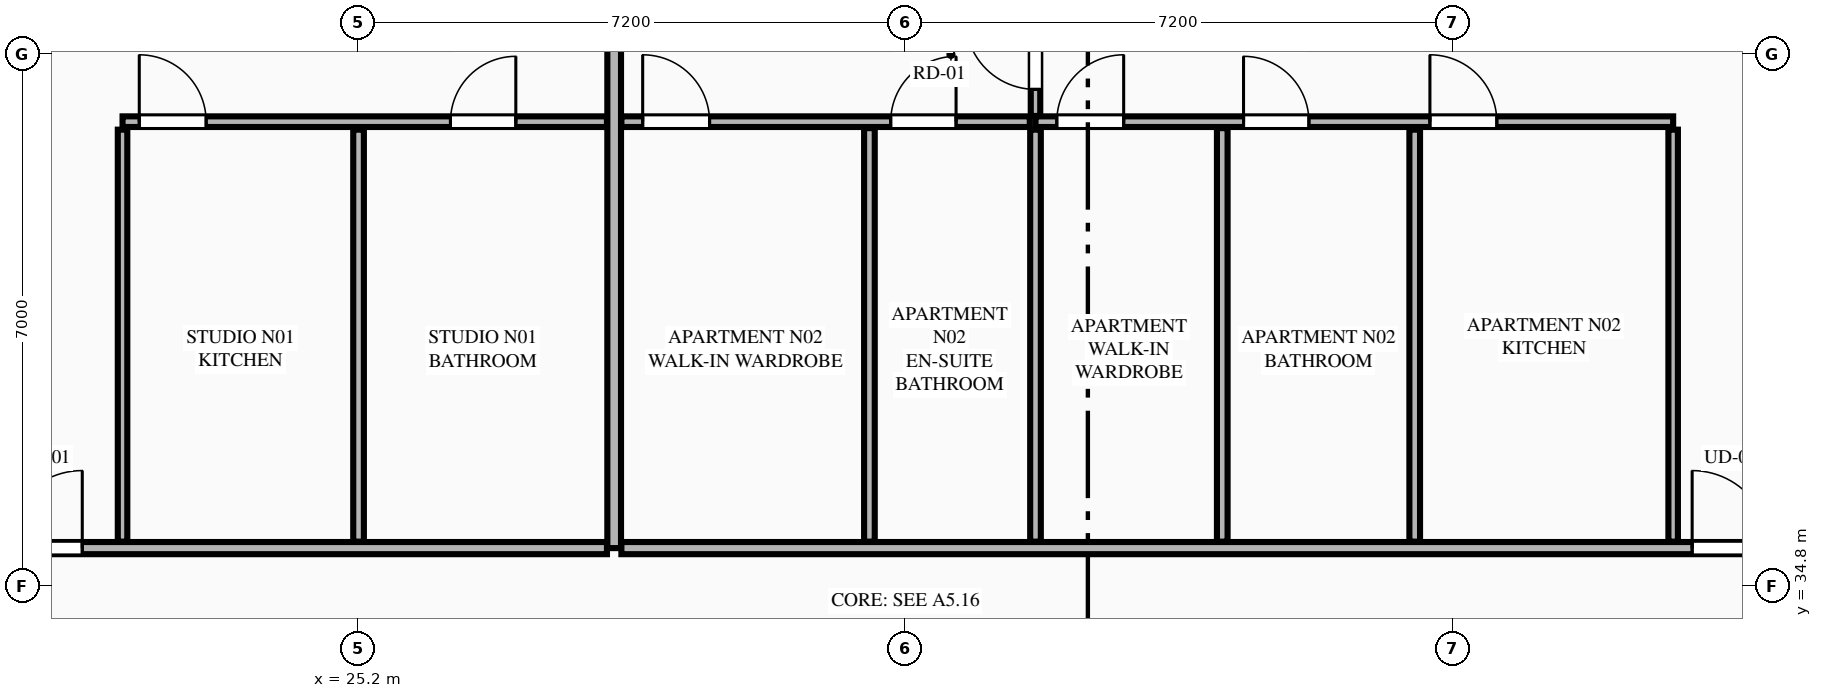
"""IFC4 building model, lengths in metres.
Left out: names, types, materials, properties, quantities, classifications, styles, units other than length and angle.
Written with IfcOpenShell. Run it as: python <this file> out.ifc"""

import sys

from ifc_helpers import new_model, si_unit, direction, frame, frame_2d, origin, place, context, subcontext, project, spatial, rectangle, extrude, element, fill, save


model = new_model("IFC4")
c1 = context("Model", 3, precision=1e-05, world=origin(), true_north=direction((0.0, 1.0)))
c2 = subcontext(c1, "Body", "Model", "MODEL_VIEW")
j1 = project(units=[si_unit("LENGTHUNIT", "METRE"), si_unit("PLANEANGLEUNIT", "RADIAN")], contexts=[c1])
p1 = place(None, origin())
s1 = spatial("IfcSite", under=j1, at=p1, CompositionType="ELEMENT")
p2 = place(p1, origin())
s2 = spatial("IfcBuilding", under=s1, at=p2, CompositionType="ELEMENT")
p3 = place(p2, frame((0.0, 0.0, 109.05)))
s3 = spatial("IfcBuildingStorey", under=s2, at=p3, CompositionType="ELEMENT", Elevation=109.05)
p4 = place(p3, frame((28.568, 35.3, 0.0), z_axis=(0.0, 0.0, 1.0), x_axis=(0.0, 1.0, 0.0)))
e1 = element("IfcWall", 1, at=p4, inside=s3, PredefinedType="PARTITIONING", context=c2, shape_type="SweptSolid", body=[
    extrude(rectangle(XDim=12.195, YDim=0.18, at=frame_2d((6.098, 0.0))), origin(), (0.0, 0.0, 1.0), 2.722),
])
p5 = place(p3, frame((20.145, 35.3, 0.0), z_axis=(0.0, 0.0, 1.0), x_axis=(1.0, 0.0, 0.0)))
e2 = element("IfcWall", 2, at=p5, inside=s3, PredefinedType="PARTITIONING", context=c2, shape_type="SweptSolid", body=[
    extrude(rectangle(XDim=8.328, YDim=0.16, at=frame_2d((4.164, 0.0))), origin(), (0.0, 0.0, 1.0), 3.34),
])
p6 = place(p5, frame((0.405, 0.0, 0.0)))
e3 = element("IfcOpeningElement", 3, at=p6, cuts=e2, PredefinedType="OPENING", context=c2, shape_type="SweptSolid", body=[
    extrude(rectangle(XDim=1.02, YDim=2.25, at=frame_2d((0.51, 1.125))), frame((0.0, 0.09, 0.0), z_axis=(0.0, -1.0, 0.0), x_axis=(1.0, 0.0, 0.0)), (0.0, 0.0, 1.0), 0.18),
])
p7 = place(p3, frame((22.1, 35.385, 0.0), z_axis=(0.0, 0.0, 1.0), x_axis=(0.0, 1.0, 0.0)))
e4 = element("IfcWall", 4, at=p7, inside=s3, PredefinedType="PARTITIONING", context=c2, shape_type="SweptSolid", body=[
    extrude(rectangle(XDim=5.42, YDim=0.125, at=frame_2d((2.71, 0.0))), origin(), (0.0, 0.0, 1.0), 2.722),
])
p8 = place(p3, frame((22.1, 40.91, 0.0), z_axis=(0.0, 0.0, 1.0), x_axis=(1.0, 0.0, 0.0)))
e5 = element("IfcWall", 5, at=p8, inside=s3, PredefinedType="PLUMBINGWALL", context=c2, shape_type="SweptSolid", body=[
    extrude(rectangle(XDim=6.373, YDim=0.14, at=frame_2d((3.187, 0.0))), origin(), (0.0, 0.0, 1.0), 3.34),
])
p9 = place(p8, frame((4.314, 0.0, 0.0)))
e6 = element("IfcOpeningElement", 6, at=p9, cuts=e5, PredefinedType="OPENING", context=c2, shape_type="SweptSolid", body=[
    extrude(rectangle(XDim=0.86, YDim=2.1, at=frame_2d((0.43, 1.05))), frame((0.0, 0.08, 0.0), z_axis=(0.0, -1.0, 0.0), x_axis=(1.0, 0.0, 0.0)), (0.0, 0.0, 1.0), 0.16),
])
p10 = place(p8, frame((0.22, 0.0, 0.0)))
e7 = element("IfcOpeningElement", 7, at=p10, cuts=e5, PredefinedType="OPENING", context=c2, shape_type="SweptSolid", body=[
    extrude(rectangle(XDim=0.88, YDim=2.15, at=frame_2d((0.44, 1.075))), frame((0.0, 0.08, 0.0), z_axis=(0.0, -1.0, 0.0), x_axis=(1.0, 0.0, 0.0)), (0.0, 0.0, 1.0), 0.16),
])
p11 = place(p3, frame((25.205, 35.385, 0.0), z_axis=(0.0, 0.0, 1.0), x_axis=(0.0, 1.0, 0.0)))
e8 = element("IfcWall", 8, at=p11, inside=s3, PredefinedType="PLUMBINGWALL", context=c2, shape_type="SweptSolid", body=[
    extrude(rectangle(XDim=5.42, YDim=0.14, at=frame_2d((2.71, 0.0))), origin(), (0.0, 0.0, 1.0), 3.34),
])
p12 = place(p3, frame((28.663, 35.3, 0.0), z_axis=(0.0, 0.0, 1.0), x_axis=(1.0, 0.0, 0.0)))
e9 = element("IfcWall", 9, at=p12, inside=s3, PredefinedType="PARTITIONING", context=c2, shape_type="SweptSolid", body=[
    extrude(rectangle(XDim=15.992, YDim=0.16, at=frame_2d((7.996, 0.0))), origin(), (0.0, 0.0, 1.0), 3.34),
])
p13 = place(p12, frame((14.087, 0.0, 0.0)))
e10 = element("IfcOpeningElement", 10, at=p13, cuts=e9, PredefinedType="OPENING", context=c2, shape_type="SweptSolid", body=[
    extrude(rectangle(XDim=1.02, YDim=2.25, at=frame_2d((0.51, 1.125))), frame((0.0, 0.09, 0.0), z_axis=(0.0, -1.0, 0.0), x_axis=(1.0, 0.0, 0.0)), (0.0, 0.0, 1.0), 0.18),
])
p14 = place(p3, frame((42.5, 35.385, 0.0), z_axis=(0.0, 0.0, 1.0), x_axis=(0.0, 1.0, 0.0)))
e11 = element("IfcWall", 11, at=p14, inside=s3, PredefinedType="PARTITIONING", context=c2, shape_type="SweptSolid", body=[
    extrude(rectangle(XDim=5.42, YDim=0.125, at=frame_2d((2.71, 0.0))), origin(), (0.0, 0.0, 1.0), 2.722),
])
p15 = place(p3, frame((34.111, 40.91, 0.0), z_axis=(0.0, 0.0, 1.0), x_axis=(1.0, 0.0, 0.0)))
e12 = element("IfcWall", 12, at=p15, inside=s3, PredefinedType="PLUMBINGWALL", context=c2, shape_type="SweptSolid", body=[
    extrude(rectangle(XDim=8.389, YDim=0.14, at=frame_2d((4.194, 0.0))), origin(), (0.0, 0.0, 1.0), 3.34),
])
p16 = place(p15, frame((0.28, 0.0, 0.0)))
e13 = element("IfcOpeningElement", 13, at=p16, cuts=e12, PredefinedType="OPENING", context=c2, shape_type="SweptSolid", body=[
    extrude(rectangle(XDim=0.88, YDim=2.15, at=frame_2d((0.44, 1.075))), frame((0.0, 0.08, 0.0), z_axis=(0.0, -1.0, 0.0), x_axis=(1.0, 0.0, 0.0)), (0.0, 0.0, 1.0), 0.16),
])
p17 = place(p15, frame((2.737, 0.0, 0.0)))
e14 = element("IfcOpeningElement", 14, at=p17, cuts=e12, PredefinedType="OPENING", context=c2, shape_type="SweptSolid", body=[
    extrude(rectangle(XDim=0.86, YDim=2.1, at=frame_2d((0.43, 1.05))), frame((0.0, 0.08, 0.0), z_axis=(0.0, -1.0, 0.0), x_axis=(1.0, 0.0, 0.0)), (0.0, 0.0, 1.0), 0.16),
])
p18 = place(p15, frame((5.189, 0.0, 0.0)))
e15 = element("IfcOpeningElement", 15, at=p18, cuts=e12, PredefinedType="OPENING", context=c2, shape_type="SweptSolid", body=[
    extrude(rectangle(XDim=0.88, YDim=2.15, at=frame_2d((0.44, 1.075))), frame((0.0, 0.08, 0.0), z_axis=(0.0, -1.0, 0.0), x_axis=(1.0, 0.0, 0.0)), (0.0, 0.0, 1.0), 0.16),
])
p19 = place(p3, frame((28.663, 40.91, 0.0), z_axis=(0.0, 0.0, 1.0), x_axis=(1.0, 0.0, 0.0)))
e16 = element("IfcWall", 16, at=p19, inside=s3, PredefinedType="PLUMBINGWALL", context=c2, shape_type="SweptSolid", body=[
    extrude(rectangle(XDim=5.373, YDim=0.14, at=frame_2d((2.687, 0.0))), origin(), (0.0, 0.0, 1.0), 3.34),
])
p20 = place(p19, frame((0.28, 0.0, 0.0)))
e17 = element("IfcOpeningElement", 17, at=p20, cuts=e16, PredefinedType="OPENING", context=c2, shape_type="SweptSolid", body=[
    extrude(rectangle(XDim=0.88, YDim=2.15, at=frame_2d((0.44, 1.075))), frame((0.0, 0.08, 0.0), z_axis=(0.0, -1.0, 0.0), x_axis=(1.0, 0.0, 0.0)), (0.0, 0.0, 1.0), 0.16),
])
p21 = place(p19, frame((3.543, 0.0, 0.0)))
e18 = element("IfcOpeningElement", 18, at=p21, cuts=e16, PredefinedType="OPENING", context=c2, shape_type="SweptSolid", body=[
    extrude(rectangle(XDim=0.86, YDim=2.1, at=frame_2d((0.43, 1.05))), frame((0.0, 0.08, 0.0), z_axis=(0.0, -1.0, 0.0), x_axis=(1.0, 0.0, 0.0)), (0.0, 0.0, 1.0), 0.16),
])
for number, where, z_axis, x_axis in (
    (19, (39.1, 35.385, 0.0), (0.0, 0.0, 1.0), (0.0, 1.0, 0.0)),
    (20, (34.111, 35.385, 0.0), (0.0, 0.0, 1.0), (0.0, 1.0, 0.0)),
):
    element("IfcWall", number, at=place(p3, frame(where, z_axis=z_axis, x_axis=x_axis)), inside=s3, PredefinedType="PLUMBINGWALL", context=c2, shape_type="SweptSolid", body=[
        extrude(rectangle(XDim=5.42, YDim=0.14, at=frame_2d((2.71, 0.0))), origin(), (0.0, 0.0, 1.0), 3.34),
    ])
p22 = place(p3, frame((34.111, 40.985, 0.0), z_axis=(0.0, 0.0, 1.0), x_axis=(0.0, 1.0, 0.0)))
e21 = element("IfcWall", 21, at=p22, inside=s3, PredefinedType="PARTITIONING", context=c2, shape_type="SweptSolid", body=[
    extrude(rectangle(XDim=6.6, YDim=0.125, at=frame_2d((3.3, 0.0))), origin(), (0.0, 0.0, 1.0), 3.34),
])
p23 = place(p22, frame((0.35, 0.0, 0.0)))
e22 = element("IfcOpeningElement", 22, at=p23, cuts=e21, PredefinedType="OPENING", context=c2, shape_type="SweptSolid", body=[
    extrude(rectangle(XDim=0.92, YDim=2.15, at=frame_2d((0.46, 1.075))), frame((0.0, 0.073, 0.0), z_axis=(0.0, -1.0, 0.0), x_axis=(1.0, 0.0, 0.0)), (0.0, 0.0, 1.0), 0.145),
])
for number, where, z_axis, x_axis in (
    (23, (36.568, 35.385, 0.0), (0.0, 0.0, 1.0), (0.0, 1.0, 0.0)),
    (24, (31.926, 35.385, 0.0), (0.0, 0.0, 1.0), (0.0, 1.0, 0.0)),
):
    element("IfcWall", number, at=place(p3, frame(where, z_axis=z_axis, x_axis=x_axis)), inside=s3, PredefinedType="PLUMBINGWALL", context=c2, shape_type="SweptSolid", body=[
        extrude(rectangle(XDim=5.44, YDim=0.14, at=frame_2d((2.72, 0.0))), origin(), (0.0, 0.0, 1.0), 3.34),
    ])
p24 = place(p9, origin())
e25 = element("IfcDoor", 25, at=p24, inside=s3, OperationType="SINGLE_SWING_RIGHT", PredefinedType="DOOR", context=c2, shape_type="SweptSolid", body=[
    extrude(rectangle(XDim=0.86, YDim=2.1, at=frame_2d((0.43, 1.05))), frame((0.0, 0.025, 0.0), z_axis=(0.0, -1.0, 0.0), x_axis=(1.0, 0.0, 0.0)), (0.0, 0.0, 1.0), 0.05),
])
fill(e6, e25)
p25 = place(p6, origin())
e26 = element("IfcDoor", 26, at=p25, inside=s3, OperationType="SINGLE_SWING_RIGHT", PredefinedType="DOOR", context=c2, shape_type="SweptSolid", body=[
    extrude(rectangle(XDim=1.02, YDim=2.25, at=frame_2d((0.51, 1.125))), frame((0.0, 0.025, 0.0), z_axis=(0.0, -1.0, 0.0), x_axis=(1.0, 0.0, 0.0)), (0.0, 0.0, 1.0), 0.05),
])
fill(e3, e26)
p26 = place(p10, origin())
e27 = element("IfcDoor", 27, at=p26, inside=s3, OperationType="SINGLE_SWING_LEFT", PredefinedType="DOOR", context=c2, shape_type="SweptSolid", body=[
    extrude(rectangle(XDim=0.88, YDim=2.15, at=frame_2d((0.44, 1.075))), frame((0.0, 0.025, 0.0), z_axis=(0.0, -1.0, 0.0), x_axis=(1.0, 0.0, 0.0)), (0.0, 0.0, 1.0), 0.05),
])
fill(e7, e27)
p27 = place(p16, origin())
e28 = element("IfcDoor", 28, at=p27, inside=s3, OperationType="SINGLE_SWING_RIGHT", PredefinedType="DOOR", context=c2, shape_type="SweptSolid", body=[
    extrude(rectangle(XDim=0.88, YDim=2.15, at=frame_2d((0.44, 1.075))), frame((0.0, 0.025, 0.0), z_axis=(0.0, -1.0, 0.0), x_axis=(1.0, 0.0, 0.0)), (0.0, 0.0, 1.0), 0.05),
])
fill(e13, e28)
p28 = place(p17, origin())
e29 = element("IfcDoor", 29, at=p28, inside=s3, OperationType="SINGLE_SWING_LEFT", PredefinedType="DOOR", context=c2, shape_type="SweptSolid", body=[
    extrude(rectangle(XDim=0.86, YDim=2.1, at=frame_2d((0.43, 1.05))), frame((0.0, 0.025, 0.0), z_axis=(0.0, -1.0, 0.0), x_axis=(1.0, 0.0, 0.0)), (0.0, 0.0, 1.0), 0.05),
])
fill(e14, e29)
p29 = place(p20, origin())
e30 = element("IfcDoor", 30, at=p29, inside=s3, OperationType="SINGLE_SWING_LEFT", PredefinedType="DOOR", context=c2, shape_type="SweptSolid", body=[
    extrude(rectangle(XDim=0.88, YDim=2.15, at=frame_2d((0.44, 1.075))), frame((0.0, 0.025, 0.0), z_axis=(0.0, -1.0, 0.0), x_axis=(1.0, 0.0, 0.0)), (0.0, 0.0, 1.0), 0.05),
])
fill(e17, e30)
p30 = place(p21, origin())
e31 = element("IfcDoor", 31, at=p30, inside=s3, OperationType="SINGLE_SWING_RIGHT", PredefinedType="DOOR", context=c2, shape_type="SweptSolid", body=[
    extrude(rectangle(XDim=0.86, YDim=2.1, at=frame_2d((0.43, 1.05))), frame((0.0, 0.025, 0.0), z_axis=(0.0, -1.0, 0.0), x_axis=(1.0, 0.0, 0.0)), (0.0, 0.0, 1.0), 0.05),
])
fill(e18, e31)
p31 = place(p13, origin())
e32 = element("IfcDoor", 32, at=p31, inside=s3, OperationType="SINGLE_SWING_LEFT", PredefinedType="DOOR", context=c2, shape_type="SweptSolid", body=[
    extrude(rectangle(XDim=1.02, YDim=2.25, at=frame_2d((0.51, 1.125))), frame((0.0, 0.025, 0.0), z_axis=(0.0, -1.0, 0.0), x_axis=(1.0, 0.0, 0.0)), (0.0, 0.0, 1.0), 0.05),
])
fill(e10, e32)
p32 = place(p18, origin())
e33 = element("IfcDoor", 33, at=p32, inside=s3, OperationType="SINGLE_SWING_LEFT", PredefinedType="DOOR", context=c2, shape_type="SweptSolid", body=[
    extrude(rectangle(XDim=0.88, YDim=2.15, at=frame_2d((0.44, 1.075))), frame((0.0, 0.025, 0.0), z_axis=(0.0, -1.0, 0.0), x_axis=(1.0, 0.0, 0.0)), (0.0, 0.0, 1.0), 0.05),
])
fill(e15, e33)
p33 = place(p23, origin())
e34 = element("IfcDoor", 34, at=p33, inside=s3, OperationType="SINGLE_SWING_RIGHT", PredefinedType="DOOR", context=c2, shape_type="SweptSolid", body=[
    extrude(rectangle(XDim=0.92, YDim=2.15, at=frame_2d((0.46, 1.075))), frame((0.0, 0.025, 0.0), z_axis=(0.0, -1.0, 0.0), x_axis=(1.0, 0.0, 0.0)), (0.0, 0.0, 1.0), 0.05),
])
fill(e22, e34)
save(model, sys.argv[1])
